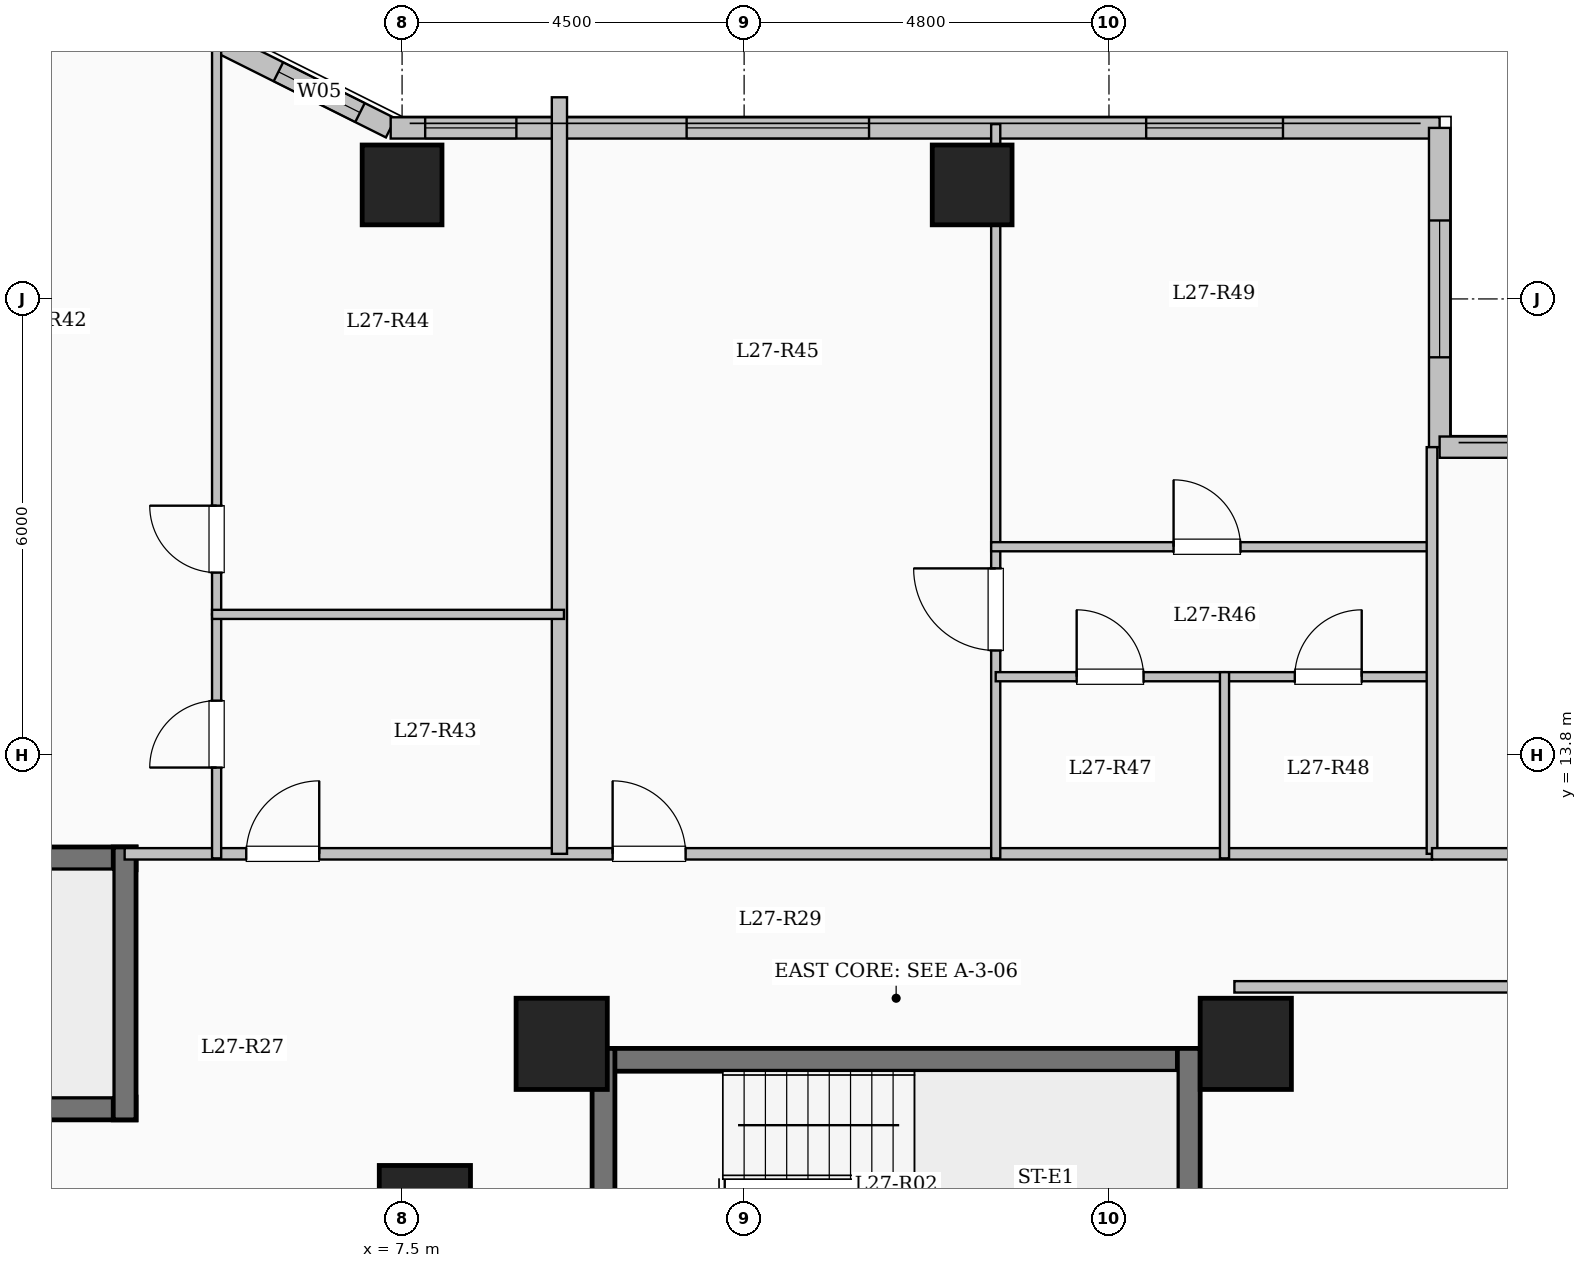
"""IFC4 building model, lengths in metres.
Left out: names, types, materials, properties, quantities, classifications, styles, units other than length and angle.
Written with IfcOpenShell. Run it as: python <this file> out.ifc"""

import sys

from ifc_helpers import new_model, si_unit, direction, frame, frame_2d, origin, origin_2d, place, context, subcontext, project, spatial, rectangle, extrude, element, fill, save


model = new_model("IFC4")
c1 = context("Model", 3, precision=1e-05, world=origin(), true_north=direction((0.0, 1.0)))
c2 = subcontext(c1, "Body", "Model", "MODEL_VIEW")
j1 = project(units=[si_unit("LENGTHUNIT", "METRE"), si_unit("PLANEANGLEUNIT", "RADIAN")], contexts=[c1])
p1 = place(None, origin())
s1 = spatial("IfcSite", under=j1, at=p1, CompositionType="ELEMENT")
p2 = place(p1, origin())
s2 = spatial("IfcBuilding", under=s1, at=p2, CompositionType="ELEMENT")
p3 = place(p2, frame((0.0, 0.0, 101.75)))
s3 = spatial("IfcBuildingStorey", under=s2, at=p3, CompositionType="ELEMENT", Elevation=101.75)
for number, where, z_axis, x_axis in (
    (1, (7.8, 7.8, 0.0), (0.0, 0.0, 1.0), (1.0, 0.0, 0.0)),
    (2, (9.6, 10.0, 0.0), (0.0, 0.0, 1.0), (1.0, 0.0, 0.0)),
    (3, (18.6, 10.0, 0.0), (0.0, 0.0, 1.0), (1.0, 0.0, 0.0)),
):
    element("IfcColumn", number, at=place(p3, frame(where, z_axis=z_axis, x_axis=x_axis)), inside=s3, PredefinedType="COLUMN", context=c2, shape_type="SweptSolid", body=[
        extrude(rectangle(XDim=1.2, YDim=1.2, at=origin_2d()), origin(), (0.0, 0.0, 1.0), 3.35),
    ])
for number, where, z_axis, x_axis in (
    (4, (7.5, 21.3, 0.0), (0.0, 0.0, 1.0), (1.0, 0.0, 0.0)),
    (5, (15.0, 21.3, 0.0), (0.0, 0.0, 1.0), (1.0, 0.0, 0.0)),
):
    element("IfcColumn", number, at=place(p3, frame(where, z_axis=z_axis, x_axis=x_axis)), inside=s3, PredefinedType="COLUMN", context=c2, shape_type="SweptSolid", body=[
        extrude(rectangle(XDim=1.05, YDim=1.05, at=origin_2d()), origin(), (0.0, 0.0, 1.0), 3.35),
    ])
p4 = place(p3, frame((4.35, 23.55, 0.0), z_axis=(0.0, 0.0, 1.0), x_axis=(0.894427191, -0.4472135955, 0.0)))
e6 = element("IfcWall", 6, at=p4, inside=s3, PredefinedType="SOLIDWALL", context=c2, shape_type="SweptSolid", body=[
    extrude(rectangle(XDim=3.354, YDim=0.28, at=frame_2d((1.677, 0.0))), origin(), (0.0, 0.0, 1.0), 3.1),
])
p5 = place(p4, frame((1.703, 0.0, 0.95)))
e7 = element("IfcOpeningElement", 7, at=p5, cuts=e6, PredefinedType="OPENING", context=c2, shape_type="SweptSolid", body=[
    extrude(rectangle(XDim=1.2, YDim=1.5, at=frame_2d((0.6, 0.75))), frame((0.0, 0.15, 0.0), z_axis=(0.0, -1.0, 0.0), x_axis=(1.0, 0.0, 0.0)), (0.0, 0.0, 1.0), 0.3),
])
p6 = place(p3, frame((7.35, 22.05, 0.0), z_axis=(0.0, 0.0, 1.0), x_axis=(1.0, 0.0, 0.0)))
e8 = element("IfcWall", 8, at=p6, inside=s3, PredefinedType="SOLIDWALL", context=c2, shape_type="SweptSolid", body=[
    extrude(rectangle(XDim=13.8, YDim=0.28, at=frame_2d((6.9, 0.0))), origin(), (0.0, 0.0, 1.0), 3.1),
])
p7 = place(p6, frame((0.454, 0.0, 0.95)))
e9 = element("IfcOpeningElement", 9, at=p7, cuts=e8, PredefinedType="OPENING", context=c2, shape_type="SweptSolid", body=[
    extrude(rectangle(XDim=1.2, YDim=1.5, at=frame_2d((0.6, 0.75))), frame((0.0, 0.15, 0.0), z_axis=(0.0, -1.0, 0.0), x_axis=(1.0, 0.0, 0.0)), (0.0, 0.0, 1.0), 0.3),
])
p8 = place(p6, frame((3.894, 0.0, 0.9)))
e10 = element("IfcOpeningElement", 10, at=p8, cuts=e8, PredefinedType="OPENING", context=c2, shape_type="SweptSolid", body=[
    extrude(rectangle(XDim=2.4, YDim=1.8, at=frame_2d((1.2, 0.9))), frame((0.0, 0.15, 0.0), z_axis=(0.0, -1.0, 0.0), x_axis=(1.0, 0.0, 0.0)), (0.0, 0.0, 1.0), 0.3),
])
p9 = place(p6, frame((9.939, 0.0, 0.9)))
e11 = element("IfcOpeningElement", 11, at=p9, cuts=e8, PredefinedType="OPENING", context=c2, shape_type="SweptSolid", body=[
    extrude(rectangle(XDim=1.8, YDim=1.65, at=frame_2d((0.9, 0.825))), frame((0.0, 0.15, 0.0), z_axis=(0.0, -1.0, 0.0), x_axis=(1.0, 0.0, 0.0)), (0.0, 0.0, 1.0), 0.3),
])
p10 = place(p3, frame((21.15, 22.05, 0.0), z_axis=(0.0, 0.0, 1.0), x_axis=(0.0, -1.0, 0.0)))
e12 = element("IfcWall", 12, at=p10, inside=s3, PredefinedType="SOLIDWALL", context=c2, shape_type="SweptSolid", body=[
    extrude(rectangle(XDim=4.2, YDim=0.28, at=frame_2d((2.1, 0.0))), origin(), (0.0, 0.0, 1.0), 3.1),
])
p11 = place(p10, frame((1.218, 0.0, 0.9)))
e13 = element("IfcOpeningElement", 13, at=p11, cuts=e12, PredefinedType="OPENING", context=c2, shape_type="SweptSolid", body=[
    extrude(rectangle(XDim=1.8, YDim=1.65, at=frame_2d((0.9, 0.825))), frame((0.0, 0.15, 0.0), z_axis=(0.0, -1.0, 0.0), x_axis=(1.0, 0.0, 0.0)), (0.0, 0.0, 1.0), 0.3),
])
p12 = place(p3, frame((21.15, 17.85, 0.0), z_axis=(0.0, 0.0, 1.0), x_axis=(1.0, 0.0, 0.0)))
e14 = element("IfcWall", 14, at=p12, inside=s3, PredefinedType="SOLIDWALL", context=c2, shape_type="SweptSolid", body=[
    extrude(rectangle(XDim=5.7, YDim=0.28, at=frame_2d((2.85, 0.0))), origin(), (0.0, 0.0, 1.0), 3.1),
])
p13 = place(p12, frame((1.825, 0.0, 0.9)))
e15 = element("IfcOpeningElement", 15, at=p13, cuts=e14, PredefinedType="OPENING", context=c2, shape_type="SweptSolid", body=[
    extrude(rectangle(XDim=2.0, YDim=1.7, at=frame_2d((1.0, 0.85))), frame((0.0, 0.15, 0.0), z_axis=(0.0, -1.0, 0.0), x_axis=(1.0, 0.0, 0.0)), (0.0, 0.0, 1.0), 0.3),
])
p14 = place(p3, frame((10.0, 9.79, 0.0), z_axis=(0.0, 0.0, 1.0), x_axis=(1.0, 0.0, 0.0)))
e16 = element("IfcWall", 16, at=p14, inside=s3, PredefinedType="SHEAR", context=c2, shape_type="SweptSolid", body=[
    extrude(rectangle(XDim=8.0, YDim=0.3, at=frame_2d((4.0, 0.0))), origin(), (0.0, 0.0, 1.0), 3.35),
])
for number, where, z_axis, x_axis in (
    (17, (10.15, 6.35, 0.0), (0.0, 0.0, 1.0), (0.0, 1.0, 0.0)),
    (18, (17.85, 6.35, 0.0), (0.0, 0.0, 1.0), (0.0, 1.0, 0.0)),
):
    element("IfcWall", number, at=place(p3, frame(where, z_axis=z_axis, x_axis=x_axis)), inside=s3, PredefinedType="SHEAR", context=c2, shape_type="SweptSolid", body=[
        extrude(rectangle(XDim=3.59, YDim=0.3, at=frame_2d((1.795, 0.0))), origin(), (0.0, 0.0, 1.0), 3.35),
    ])
p15 = place(p3, frame((-4.0, 12.44, 0.0), z_axis=(0.0, 0.0, 1.0), x_axis=(1.0, 0.0, 0.0)))
e19 = element("IfcWall", 19, at=p15, inside=s3, PredefinedType="SHEAR", context=c2, shape_type="SweptSolid", body=[
    extrude(rectangle(XDim=8.0, YDim=0.3, at=frame_2d((4.0, 0.0))), origin(), (0.0, 0.0, 1.0), 3.35),
])
p16 = place(p3, frame((-4.0, 9.15, 0.0), z_axis=(0.0, 0.0, 1.0), x_axis=(1.0, 0.0, 0.0)))
e20 = element("IfcWall", 20, at=p16, inside=s3, PredefinedType="SHEAR", context=c2, shape_type="SweptSolid", body=[
    extrude(rectangle(XDim=8.0, YDim=0.3, at=frame_2d((4.0, 0.0))), origin(), (0.0, 0.0, 1.0), 3.35),
])
p17 = place(p16, frame((0.55, 0.0, 0.0)))
e21 = element("IfcOpeningElement", 21, at=p17, cuts=e20, PredefinedType="OPENING", context=c2, shape_type="SweptSolid", body=[
    extrude(rectangle(XDim=1.0, YDim=2.15, at=frame_2d((0.5, 1.075))), frame((0.0, 0.16, 0.0), z_axis=(0.0, -1.0, 0.0), x_axis=(1.0, 0.0, 0.0)), (0.0, 0.0, 1.0), 0.32),
])
p18 = place(p3, frame((3.85, 9.0, 0.0), z_axis=(0.0, 0.0, 1.0), x_axis=(0.0, 1.0, 0.0)))
e22 = element("IfcWall", 22, at=p18, inside=s3, PredefinedType="SHEAR", context=c2, shape_type="SweptSolid", body=[
    extrude(rectangle(XDim=3.59, YDim=0.3, at=frame_2d((1.795, 0.0))), origin(), (0.0, 0.0, 1.0), 3.35),
])
p19 = place(p3, frame((3.85, 12.5, 0.0), z_axis=(0.0, 0.0, 1.0), x_axis=(1.0, 0.0, 0.0)))
e23 = element("IfcWall", 23, at=p19, inside=s3, PredefinedType="PARTITIONING", context=c2, shape_type="SweptSolid", body=[
    extrude(rectangle(XDim=17.2, YDim=0.15, at=frame_2d((8.6, 0.0))), origin(), (0.0, 0.0, 1.0), 3.1),
])
p20 = place(p19, frame((1.6, 0.0, 0.0)))
e24 = element("IfcOpeningElement", 24, at=p20, cuts=e23, PredefinedType="OPENING", context=c2, shape_type="SweptSolid", body=[
    extrude(rectangle(XDim=0.96, YDim=2.15, at=frame_2d((0.48, 1.075))), frame((0.0, 0.085, 0.0), z_axis=(0.0, -1.0, 0.0), x_axis=(1.0, 0.0, 0.0)), (0.0, 0.0, 1.0), 0.17),
])
p21 = place(p19, frame((6.42, 0.0, 0.0)))
e25 = element("IfcOpeningElement", 25, at=p21, cuts=e23, PredefinedType="OPENING", context=c2, shape_type="SweptSolid", body=[
    extrude(rectangle(XDim=0.96, YDim=2.15, at=frame_2d((0.48, 1.075))), frame((0.0, 0.085, 0.0), z_axis=(0.0, -1.0, 0.0), x_axis=(1.0, 0.0, 0.0)), (0.0, 0.0, 1.0), 0.17),
])
p22 = place(p3, frame((9.57, 12.5, 0.0), z_axis=(0.0, 0.0, 1.0), x_axis=(0.0, 1.0, 0.0)))
e26 = element("IfcWall", 26, at=p22, inside=s3, PredefinedType="SOLIDWALL", context=c2, shape_type="SweptSolid", body=[
    extrude(rectangle(XDim=9.953, YDim=0.2, at=frame_2d((4.977, 0.0))), origin(), (0.0, 0.0, 1.0), 3.1),
])
p23 = place(p3, frame((5.06, 12.44, 0.0), z_axis=(0.0, 0.0, 1.0), x_axis=(0.0, 1.0, 0.0)))
e27 = element("IfcWall", 27, at=p23, inside=s3, PredefinedType="PARTITIONING", context=c2, shape_type="SweptSolid", body=[
    extrude(rectangle(XDim=3.21, YDim=0.12, at=frame_2d((1.605, 0.0))), origin(), (0.0, 0.0, 1.0), 3.1),
])
p24 = place(p23, frame((1.195, 0.0, 0.0)))
e28 = element("IfcOpeningElement", 28, at=p24, cuts=e27, PredefinedType="OPENING", context=c2, shape_type="SweptSolid", body=[
    extrude(rectangle(XDim=0.88, YDim=2.1, at=frame_2d((0.44, 1.05))), frame((0.0, 0.07, 0.0), z_axis=(0.0, -1.0, 0.0), x_axis=(1.0, 0.0, 0.0)), (0.0, 0.0, 1.0), 0.14),
])
p25 = place(p3, frame((5.06, 15.65, 0.0), z_axis=(0.0, 0.0, 1.0), x_axis=(0.0, 1.0, 0.0)))
e29 = element("IfcWall", 29, at=p25, inside=s3, PredefinedType="PARTITIONING", context=c2, shape_type="SweptSolid", body=[
    extrude(rectangle(XDim=7.915, YDim=0.12, at=frame_2d((3.958, 0.0))), origin(), (0.0, 0.0, 1.0), 3.1),
])
p26 = place(p25, frame((0.55, 0.0, 0.0)))
e30 = element("IfcOpeningElement", 30, at=p26, cuts=e29, PredefinedType="OPENING", context=c2, shape_type="SweptSolid", body=[
    extrude(rectangle(XDim=0.88, YDim=2.1, at=frame_2d((0.44, 1.05))), frame((0.0, 0.07, 0.0), z_axis=(0.0, -1.0, 0.0), x_axis=(1.0, 0.0, 0.0)), (0.0, 0.0, 1.0), 0.14),
])
p27 = place(p3, frame((5.0, 15.65, 0.0), z_axis=(0.0, 0.0, 1.0), x_axis=(1.0, 0.0, 0.0)))
e31 = element("IfcWall", 31, at=p27, inside=s3, PredefinedType="PARTITIONING", context=c2, shape_type="SweptSolid", body=[
    extrude(rectangle(XDim=4.63, YDim=0.12, at=frame_2d((2.315, 0.0))), origin(), (0.0, 0.0, 1.0), 3.1),
])
p28 = place(p3, frame((15.31, 12.44, 0.0), z_axis=(0.0, 0.0, 1.0), x_axis=(0.0, 1.0, 0.0)))
e32 = element("IfcWall", 32, at=p28, inside=s3, PredefinedType="PARTITIONING", context=c2, shape_type="SweptSolid", body=[
    extrude(rectangle(XDim=9.66, YDim=0.12, at=frame_2d((4.83, 0.0))), origin(), (0.0, 0.0, 1.0), 2.435),
])
p29 = place(p28, frame((2.735, 0.0, 0.0)))
e33 = element("IfcOpeningElement", 33, at=p29, cuts=e32, PredefinedType="OPENING", context=c2, shape_type="SweptSolid", body=[
    extrude(rectangle(XDim=1.08, YDim=2.15, at=frame_2d((0.54, 1.075))), frame((0.0, 0.07, 0.0), z_axis=(0.0, -1.0, 0.0), x_axis=(1.0, 0.0, 0.0)), (0.0, 0.0, 1.0), 0.14),
])
p30 = place(p3, frame((15.31, 14.83, 0.0), z_axis=(0.0, 0.0, 1.0), x_axis=(1.0, 0.0, 0.0)))
e34 = element("IfcWall", 34, at=p30, inside=s3, PredefinedType="PARTITIONING", context=c2, shape_type="SweptSolid", body=[
    extrude(rectangle(XDim=3.01, YDim=0.12, at=frame_2d((1.505, 0.0))), origin(), (0.0, 0.0, 1.0), 3.1),
])
p31 = place(p30, frame((1.065, 0.0, 0.0)))
e35 = element("IfcOpeningElement", 35, at=p31, cuts=e34, PredefinedType="OPENING", context=c2, shape_type="SweptSolid", body=[
    extrude(rectangle(XDim=0.88, YDim=2.1, at=frame_2d((0.44, 1.05))), frame((0.0, 0.07, 0.0), z_axis=(0.0, -1.0, 0.0), x_axis=(1.0, 0.0, 0.0)), (0.0, 0.0, 1.0), 0.14),
])
p32 = place(p3, frame((18.32, 14.83, 0.0), z_axis=(0.0, 0.0, 1.0), x_axis=(1.0, 0.0, 0.0)))
e36 = element("IfcWall", 36, at=p32, inside=s3, PredefinedType="PARTITIONING", context=c2, shape_type="SweptSolid", body=[
    extrude(rectangle(XDim=2.73, YDim=0.12, at=frame_2d((1.365, 0.0))), origin(), (0.0, 0.0, 1.0), 3.1),
])
p33 = place(p32, frame((0.925, 0.0, 0.0)))
e37 = element("IfcOpeningElement", 37, at=p33, cuts=e36, PredefinedType="OPENING", context=c2, shape_type="SweptSolid", body=[
    extrude(rectangle(XDim=0.88, YDim=2.1, at=frame_2d((0.44, 1.05))), frame((0.0, 0.07, 0.0), z_axis=(0.0, -1.0, 0.0), x_axis=(1.0, 0.0, 0.0)), (0.0, 0.0, 1.0), 0.14),
])
p34 = place(p3, frame((15.25, 16.54, 0.0), z_axis=(0.0, 0.0, 1.0), x_axis=(1.0, 0.0, 0.0)))
e38 = element("IfcWall", 38, at=p34, inside=s3, PredefinedType="PARTITIONING", context=c2, shape_type="SweptSolid", body=[
    extrude(rectangle(XDim=5.86, YDim=0.12, at=frame_2d((2.93, 0.0))), origin(), (0.0, 0.0, 1.0), 3.1),
])
p35 = place(p34, frame((2.4, 0.0, 0.0)))
e39 = element("IfcOpeningElement", 39, at=p35, cuts=e38, PredefinedType="OPENING", context=c2, shape_type="SweptSolid", body=[
    extrude(rectangle(XDim=0.88, YDim=2.1, at=frame_2d((0.44, 1.05))), frame((0.0, 0.07, 0.0), z_axis=(0.0, -1.0, 0.0), x_axis=(1.0, 0.0, 0.0)), (0.0, 0.0, 1.0), 0.14),
])
p36 = place(p3, frame((18.32, 12.44, 0.0), z_axis=(0.0, 0.0, 1.0), x_axis=(0.0, 1.0, 0.0)))
e40 = element("IfcWall", 40, at=p36, inside=s3, PredefinedType="PARTITIONING", context=c2, shape_type="SweptSolid", body=[
    extrude(rectangle(XDim=2.45, YDim=0.12, at=frame_2d((1.225, 0.0))), origin(), (0.0, 0.0, 1.0), 3.1),
])
p37 = place(p3, frame((18.45, 10.75, 0.0), z_axis=(0.0, 0.0, 1.0), x_axis=(1.0, 0.0, 0.0)))
e41 = element("IfcWall", 41, at=p37, inside=s3, PredefinedType="PARTITIONING", context=c2, shape_type="SweptSolid", body=[
    extrude(rectangle(XDim=8.43, YDim=0.15, at=frame_2d((4.215, 0.0))), origin(), (0.0, 0.0, 1.0), 3.1),
])
p38 = place(p3, frame((21.05, 12.5, 0.0), z_axis=(0.0, 0.0, 1.0), x_axis=(0.0, 1.0, 0.0)))
e42 = element("IfcWall", 42, at=p38, inside=s3, PredefinedType="PARTITIONING", context=c2, shape_type="SweptSolid", body=[
    extrude(rectangle(XDim=5.35, YDim=0.14, at=frame_2d((2.675, 0.0))), origin(), (0.0, 0.0, 1.0), 3.1),
])
p39 = place(p3, frame((21.05, 12.5, 0.0), z_axis=(0.0, 0.0, 1.0), x_axis=(1.0, 0.0, 0.0)))
e43 = element("IfcWall", 43, at=p39, inside=s3, PredefinedType="PARTITIONING", context=c2, shape_type="SweptSolid", body=[
    extrude(rectangle(XDim=5.83, YDim=0.15, at=frame_2d((2.915, 0.0))), origin(), (0.0, 0.0, 1.0), 3.1),
])
p40 = place(p39, frame((2.44, 0.0, 0.0)))
e44 = element("IfcOpeningElement", 44, at=p40, cuts=e43, PredefinedType="OPENING", context=c2, shape_type="SweptSolid", body=[
    extrude(rectangle(XDim=0.95, YDim=2.15, at=frame_2d((0.475, 1.075))), frame((0.0, 0.085, 0.0), z_axis=(0.0, -1.0, 0.0), x_axis=(1.0, 0.0, 0.0)), (0.0, 0.0, 1.0), 0.17),
])
p41 = place(p5, origin())
e45 = element("IfcWindow", 45, at=p41, inside=s3, PartitioningType="SINGLE_PANEL", PredefinedType="WINDOW", context=c2, shape_type="SweptSolid", body=[
    extrude(rectangle(XDim=1.2, YDim=1.5, at=frame_2d((0.6, 0.75))), frame((0.0, 0.03, 0.0), z_axis=(0.0, -1.0, 0.0), x_axis=(1.0, 0.0, 0.0)), (0.0, 0.0, 1.0), 0.06),
])
fill(e7, e45)
p42 = place(p7, origin())
e46 = element("IfcWindow", 46, at=p42, inside=s3, PartitioningType="SINGLE_PANEL", PredefinedType="WINDOW", context=c2, shape_type="SweptSolid", body=[
    extrude(rectangle(XDim=1.2, YDim=1.5, at=frame_2d((0.6, 0.75))), frame((0.0, 0.03, 0.0), z_axis=(0.0, -1.0, 0.0), x_axis=(1.0, 0.0, 0.0)), (0.0, 0.0, 1.0), 0.06),
])
fill(e9, e46)
p43 = place(p8, origin())
e47 = element("IfcWindow", 47, at=p43, inside=s3, PartitioningType="SINGLE_PANEL", PredefinedType="WINDOW", context=c2, shape_type="SweptSolid", body=[
    extrude(rectangle(XDim=2.4, YDim=1.8, at=frame_2d((1.2, 0.9))), frame((0.0, 0.03, 0.0), z_axis=(0.0, -1.0, 0.0), x_axis=(1.0, 0.0, 0.0)), (0.0, 0.0, 1.0), 0.06),
])
fill(e10, e47)
p44 = place(p9, origin())
e48 = element("IfcWindow", 48, at=p44, inside=s3, PartitioningType="SINGLE_PANEL", PredefinedType="WINDOW", context=c2, shape_type="SweptSolid", body=[
    extrude(rectangle(XDim=1.8, YDim=1.65, at=frame_2d((0.9, 0.825))), frame((0.0, 0.03, 0.0), z_axis=(0.0, -1.0, 0.0), x_axis=(1.0, 0.0, 0.0)), (0.0, 0.0, 1.0), 0.06),
])
fill(e11, e48)
p45 = place(p11, origin())
e49 = element("IfcWindow", 49, at=p45, inside=s3, PartitioningType="SINGLE_PANEL", PredefinedType="WINDOW", context=c2, shape_type="SweptSolid", body=[
    extrude(rectangle(XDim=1.8, YDim=1.65, at=frame_2d((0.9, 0.825))), frame((0.0, 0.03, 0.0), z_axis=(0.0, -1.0, 0.0), x_axis=(1.0, 0.0, 0.0)), (0.0, 0.0, 1.0), 0.06),
])
fill(e13, e49)
p46 = place(p20, origin())
e50 = element("IfcDoor", 50, at=p46, inside=s3, OperationType="SINGLE_SWING_RIGHT", PredefinedType="DOOR", context=c2, shape_type="SweptSolid", body=[
    extrude(rectangle(XDim=0.96, YDim=2.15, at=frame_2d((0.48, 1.075))), frame((0.0, 0.025, 0.0), z_axis=(0.0, -1.0, 0.0), x_axis=(1.0, 0.0, 0.0)), (0.0, 0.0, 1.0), 0.05),
])
fill(e24, e50)
p47 = place(p24, origin())
e51 = element("IfcDoor", 51, at=p47, inside=s3, OperationType="SINGLE_SWING_LEFT", PredefinedType="DOOR", context=c2, shape_type="SweptSolid", body=[
    extrude(rectangle(XDim=0.88, YDim=2.1, at=frame_2d((0.44, 1.05))), frame((0.0, 0.025, 0.0), z_axis=(0.0, -1.0, 0.0), x_axis=(1.0, 0.0, 0.0)), (0.0, 0.0, 1.0), 0.05),
])
fill(e28, e51)
p48 = place(p26, origin())
e52 = element("IfcDoor", 52, at=p48, inside=s3, OperationType="SINGLE_SWING_RIGHT", PredefinedType="DOOR", context=c2, shape_type="SweptSolid", body=[
    extrude(rectangle(XDim=0.88, YDim=2.1, at=frame_2d((0.44, 1.05))), frame((0.0, 0.025, 0.0), z_axis=(0.0, -1.0, 0.0), x_axis=(1.0, 0.0, 0.0)), (0.0, 0.0, 1.0), 0.05),
])
fill(e30, e52)
p49 = place(p21, origin())
e53 = element("IfcDoor", 53, at=p49, inside=s3, OperationType="SINGLE_SWING_LEFT", PredefinedType="DOOR", context=c2, shape_type="SweptSolid", body=[
    extrude(rectangle(XDim=0.96, YDim=2.15, at=frame_2d((0.48, 1.075))), frame((0.0, 0.025, 0.0), z_axis=(0.0, -1.0, 0.0), x_axis=(1.0, 0.0, 0.0)), (0.0, 0.0, 1.0), 0.05),
])
fill(e25, e53)
p50 = place(p29, origin())
e54 = element("IfcDoor", 54, at=p50, inside=s3, OperationType="SINGLE_SWING_RIGHT", PredefinedType="DOOR", context=c2, shape_type="SweptSolid", body=[
    extrude(rectangle(XDim=1.08, YDim=2.15, at=frame_2d((0.54, 1.075))), frame((0.0, 0.025, 0.0), z_axis=(0.0, -1.0, 0.0), x_axis=(1.0, 0.0, 0.0)), (0.0, 0.0, 1.0), 0.05),
])
fill(e33, e54)
p51 = place(p31, origin())
e55 = element("IfcDoor", 55, at=p51, inside=s3, OperationType="SINGLE_SWING_LEFT", PredefinedType="DOOR", context=c2, shape_type="SweptSolid", body=[
    extrude(rectangle(XDim=0.88, YDim=2.1, at=frame_2d((0.44, 1.05))), frame((0.0, 0.025, 0.0), z_axis=(0.0, -1.0, 0.0), x_axis=(1.0, 0.0, 0.0)), (0.0, 0.0, 1.0), 0.05),
])
fill(e35, e55)
p52 = place(p33, origin())
e56 = element("IfcDoor", 56, at=p52, inside=s3, OperationType="SINGLE_SWING_RIGHT", PredefinedType="DOOR", context=c2, shape_type="SweptSolid", body=[
    extrude(rectangle(XDim=0.88, YDim=2.1, at=frame_2d((0.44, 1.05))), frame((0.0, 0.025, 0.0), z_axis=(0.0, -1.0, 0.0), x_axis=(1.0, 0.0, 0.0)), (0.0, 0.0, 1.0), 0.05),
])
fill(e37, e56)
p53 = place(p35, origin())
e57 = element("IfcDoor", 57, at=p53, inside=s3, OperationType="SINGLE_SWING_LEFT", PredefinedType="DOOR", context=c2, shape_type="SweptSolid", body=[
    extrude(rectangle(XDim=0.88, YDim=2.1, at=frame_2d((0.44, 1.05))), frame((0.0, 0.025, 0.0), z_axis=(0.0, -1.0, 0.0), x_axis=(1.0, 0.0, 0.0)), (0.0, 0.0, 1.0), 0.05),
])
fill(e39, e57)
save(model, sys.argv[1])
